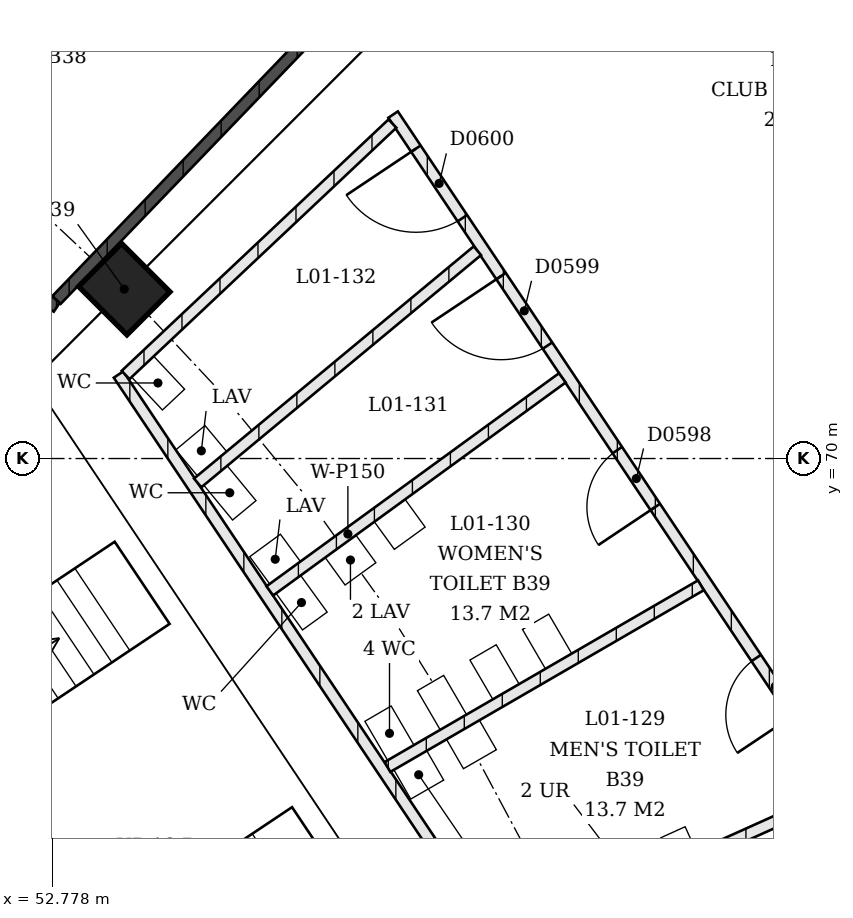
"""IFC4 building model, lengths in metres.
Left out: names, types, materials, properties, quantities, classifications, styles, units other than length and angle.
Written with IfcOpenShell. Run it as: python <this file> out.ifc"""

import sys

from ifc_helpers import new_model, si_unit, direction, frame, frame_2d, origin, origin_2d, place, context, subcontext, project, spatial, rectangle, extrude, element, fill, save


model = new_model("IFC4")
c1 = context("Model", 3, precision=1e-05, world=origin(), true_north=direction((0.0, 1.0)))
c2 = subcontext(c1, "Body", "Model", "MODEL_VIEW")
j1 = project(units=[si_unit("LENGTHUNIT", "METRE"), si_unit("PLANEANGLEUNIT", "RADIAN")], contexts=[c1])
p1 = place(None, origin())
s1 = spatial("IfcSite", under=j1, at=p1, CompositionType="ELEMENT")
p2 = place(p1, origin())
s2 = spatial("IfcBuilding", under=s1, at=p2, CompositionType="ELEMENT")
p3 = place(p2, frame((0.0, 0.0, 4.5)))
s3 = spatial("IfcBuildingStorey", under=s2, at=p3, CompositionType="ELEMENT", Elevation=4.5)
p4 = place(p3, frame((53.728, 72.228, 0.0), z_axis=(0.0, 0.0, 1.0), x_axis=(-0.707106781187, 0.707106781187, 0.0)))
e1 = element("IfcColumn", 1, at=p4, inside=s3, PredefinedType="COLUMN", context=c2, shape_type="SweptSolid", body=[
    extrude(rectangle(XDim=0.9, YDim=0.8, at=origin_2d()), origin(), (0.0, 0.0, 1.0), 4.5),
])
p5 = place(p3, frame((45.037, 77.21, 0.0), z_axis=(0.0, 0.0, 1.0), x_axis=(0.83146970134, -0.555570099766, 0.0)))
e2 = element("IfcWall", 2, at=p5, inside=s3, PredefinedType="SOLIDWALL", context=c2, shape_type="SweptSolid", body=[
    extrude(rectangle(XDim=9.388, YDim=0.15, at=frame_2d((4.694, 0.0))), origin(), (0.0, 0.0, 1.0), 3.0),
])
p6 = place(p3, frame((52.837, 72.086, 0.0), z_axis=(0.0, 0.0, 1.0), x_axis=(0.693179391143, 0.720765101607, 0.0)))
e3 = element("IfcWall", 3, at=p6, inside=s3, PredefinedType="SOLIDWALL", context=c2, shape_type="SweptSolid", body=[
    extrude(rectangle(XDim=4.832, YDim=0.15, at=frame_2d((2.416, 0.0))), origin(), (0.0, 0.0, 1.0), 3.0),
])
p7 = place(p3, frame((58.71, 63.537, 0.0), z_axis=(0.0, 0.0, 1.0), x_axis=(-0.555566497886, 0.831472108027, 0.0)))
e4 = element("IfcWall", 4, at=p7, inside=s3, PredefinedType="PARTITIONING", context=c2, shape_type="SweptSolid", body=[
    extrude(rectangle(XDim=9.102, YDim=0.15, at=frame_2d((4.551, 0.0))), origin(), (0.0, 0.0, 1.0), 3.0),
])
p8 = place(p3, frame((63.252, 65.566, 0.0), z_axis=(0.0, 0.0, 1.0), x_axis=(-0.555562662276, 0.831474670862, 0.0)))
e5 = element("IfcWall", 5, at=p8, inside=s3, PredefinedType="PARTITIONING", context=c2, shape_type="SweptSolid", body=[
    extrude(rectangle(XDim=10.775, YDim=0.15, at=frame_2d((5.387, 0.0))), origin(), (0.0, 0.0, 1.0), 3.0),
])
p9 = place(p8, frame((1.276, 0.0, 0.0)))
e6 = element("IfcOpeningElement", 6, at=p9, cuts=e5, PredefinedType="OPENING", context=c2, shape_type="SweptSolid", body=[
    extrude(rectangle(XDim=0.9, YDim=2.1, at=frame_2d((0.45, 1.05))), frame((0.0, 0.075, 0.0), z_axis=(0.0, -1.0, 0.0), x_axis=(1.0, 0.0, 0.0)), (0.0, 0.0, 1.0), 0.15),
])
p10 = place(p8, frame((4.566, 0.0, 0.0)))
e7 = element("IfcOpeningElement", 7, at=p10, cuts=e5, PredefinedType="OPENING", context=c2, shape_type="SweptSolid", body=[
    extrude(rectangle(XDim=0.9, YDim=2.1, at=frame_2d((0.45, 1.05))), frame((0.0, 0.075, 0.0), z_axis=(0.0, -1.0, 0.0), x_axis=(1.0, 0.0, 0.0)), (0.0, 0.0, 1.0), 0.15),
])
p11 = place(p8, frame((7.119, 0.0, 0.0)))
e8 = element("IfcOpeningElement", 8, at=p11, cuts=e5, PredefinedType="OPENING", context=c2, shape_type="SweptSolid", body=[
    extrude(rectangle(XDim=1.1, YDim=2.1, at=frame_2d((0.55, 1.05))), frame((0.0, 0.075, 0.0), z_axis=(0.0, -1.0, 0.0), x_axis=(1.0, 0.0, 0.0)), (0.0, 0.0, 1.0), 0.15),
])
p12 = place(p8, frame((9.135, 0.0, 0.0)))
e9 = element("IfcOpeningElement", 9, at=p12, cuts=e5, PredefinedType="OPENING", context=c2, shape_type="SweptSolid", body=[
    extrude(rectangle(XDim=1.1, YDim=2.1, at=frame_2d((0.55, 1.05))), frame((0.0, 0.075, 0.0), z_axis=(0.0, -1.0, 0.0), x_axis=(1.0, 0.0, 0.0)), (0.0, 0.0, 1.0), 0.15),
])
p13 = place(p3, frame((58.74, 63.625, 0.0), z_axis=(0.0, 0.0, 1.0), x_axis=(0.912037017215, 0.410107887306, 0.0)))
e10 = element("IfcWall", 10, at=p13, inside=s3, PredefinedType="PARTITIONING", context=c2, shape_type="SweptSolid", body=[
    extrude(rectangle(XDim=4.823, YDim=0.15, at=frame_2d((2.412, 0.0))), origin(), (0.0, 0.0, 1.0), 3.0),
])
p14 = place(p3, frame((57.191, 65.942, 0.0), z_axis=(0.0, 0.0, 1.0), x_axis=(0.865194750368, 0.501435981891, 0.0)))
e11 = element("IfcWall", 11, at=p14, inside=s3, PredefinedType="PARTITIONING", context=c2, shape_type="SweptSolid", body=[
    extrude(rectangle(XDim=4.767, YDim=0.15, at=frame_2d((2.383, 0.0))), origin(), (0.0, 0.0, 1.0), 3.0),
])
p15 = place(p3, frame((55.643, 68.259, 0.0), z_axis=(0.0, 0.0, 1.0), x_axis=(0.808436593482, 0.588583277302, 0.0)))
e12 = element("IfcWall", 12, at=p15, inside=s3, PredefinedType="PARTITIONING", context=c2, shape_type="SweptSolid", body=[
    extrude(rectangle(XDim=4.76, YDim=0.15, at=frame_2d((2.38, 0.0))), origin(), (0.0, 0.0, 1.0), 3.0),
])
p16 = place(p3, frame((54.694, 69.679, 0.0), z_axis=(0.0, 0.0, 1.0), x_axis=(0.769445858721, 0.638712040358, 0.0)))
e13 = element("IfcWall", 13, at=p16, inside=s3, PredefinedType="PARTITIONING", context=c2, shape_type="SweptSolid", body=[
    extrude(rectangle(XDim=4.782, YDim=0.15, at=frame_2d((2.391, 0.0))), origin(), (0.0, 0.0, 1.0), 3.0),
])
p17 = place(p3, frame((53.746, 71.099, 0.0), z_axis=(0.0, 0.0, 1.0), x_axis=(0.727898273696, 0.685685134118, 0.0)))
e14 = element("IfcWall", 14, at=p17, inside=s3, PredefinedType="PARTITIONING", context=c2, shape_type="SweptSolid", body=[
    extrude(rectangle(XDim=4.823, YDim=0.15, at=frame_2d((2.412, 0.0))), origin(), (0.0, 0.0, 1.0), 3.0),
])
p18 = place(p9, origin())
e15 = element("IfcDoor", 15, at=p18, inside=s3, OperationType="SINGLE_SWING_RIGHT", PredefinedType="DOOR", context=c2, shape_type="SweptSolid", body=[
    extrude(rectangle(XDim=0.9, YDim=2.1, at=frame_2d((0.45, 1.05))), frame((0.0, 0.025, 0.0), z_axis=(0.0, -1.0, 0.0), x_axis=(1.0, 0.0, 0.0)), (0.0, 0.0, 1.0), 0.05),
])
fill(e6, e15)
p19 = place(p10, origin())
e16 = element("IfcDoor", 16, at=p19, inside=s3, OperationType="SINGLE_SWING_RIGHT", PredefinedType="DOOR", context=c2, shape_type="SweptSolid", body=[
    extrude(rectangle(XDim=0.9, YDim=2.1, at=frame_2d((0.45, 1.05))), frame((0.0, 0.025, 0.0), z_axis=(0.0, -1.0, 0.0), x_axis=(1.0, 0.0, 0.0)), (0.0, 0.0, 1.0), 0.05),
])
fill(e7, e16)
p20 = place(p11, origin())
e17 = element("IfcDoor", 17, at=p20, inside=s3, OperationType="SINGLE_SWING_LEFT", PredefinedType="DOOR", context=c2, shape_type="SweptSolid", body=[
    extrude(rectangle(XDim=1.1, YDim=2.1, at=frame_2d((0.55, 1.05))), frame((0.0, 0.025, 0.0), z_axis=(0.0, -1.0, 0.0), x_axis=(1.0, 0.0, 0.0)), (0.0, 0.0, 1.0), 0.05),
])
fill(e8, e17)
p21 = place(p12, origin())
e18 = element("IfcDoor", 18, at=p21, inside=s3, OperationType="SINGLE_SWING_LEFT", PredefinedType="DOOR", context=c2, shape_type="SweptSolid", body=[
    extrude(rectangle(XDim=1.1, YDim=2.1, at=frame_2d((0.55, 1.05))), frame((0.0, 0.025, 0.0), z_axis=(0.0, -1.0, 0.0), x_axis=(1.0, 0.0, 0.0)), (0.0, 0.0, 1.0), 0.05),
])
fill(e9, e18)
save(model, sys.argv[1])
